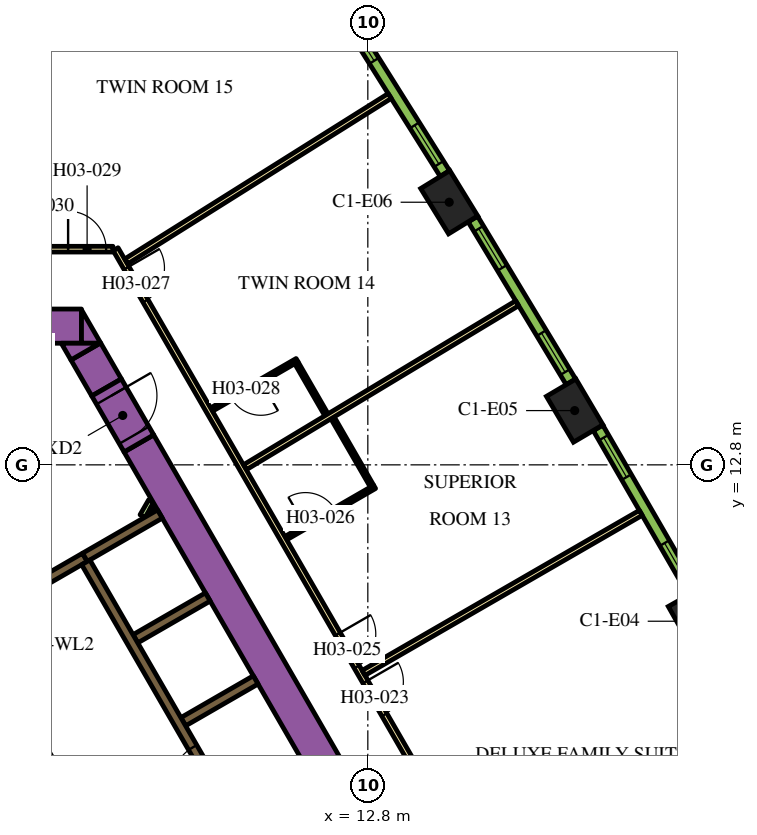
"""IFC4 building model, lengths in metres.
Left out: names, types, materials, properties, quantities, classifications, styles, units other than length and angle.
Written with IfcOpenShell. Run it as: python <this file> out.ifc"""

import sys

from ifc_helpers import new_model, si_unit, direction, frame, frame_2d, origin, origin_2d, place, context, subcontext, project, spatial, polyline, rectangle, outline, extrude, element, fill, save


model = new_model("IFC4")
c1 = context("Model", 3, precision=1e-05, world=origin(), true_north=direction((0.0, 1.0)))
c2 = subcontext(c1, "Body", "Model", "MODEL_VIEW")
j1 = project(units=[si_unit("LENGTHUNIT", "METRE"), si_unit("PLANEANGLEUNIT", "RADIAN")], contexts=[c1])
p1 = place(None, origin())
s1 = spatial("IfcSite", under=j1, at=p1, CompositionType="ELEMENT")
p2 = place(p1, origin())
s2 = spatial("IfcBuilding", under=s1, at=p2, CompositionType="ELEMENT")
p3 = place(p2, frame((0.0, 0.0, 54.9)))
s3 = spatial("IfcBuildingStorey", under=s2, at=p3, CompositionType="ELEMENT", Elevation=54.9)
for number, where, z_axis, x_axis in (
    (1, (21.443, 8.685, 0.0), (0.0, 0.0, 1.0), (-0.492, 0.871, 0.0)),
    (2, (18.243, 14.228, 0.0), (0.0, 0.0, 1.0), (-0.508, 0.861, 0.0)),
    (3, (14.942, 19.71, 0.0), (0.0, 0.0, 1.0), (-0.524, 0.852, 0.0)),
):
    element("IfcColumn", number, at=place(p3, frame(where, z_axis=z_axis, x_axis=x_axis)), inside=s3, PredefinedType="COLUMN", context=c2, shape_type="SweptSolid", body=[
        extrude(rectangle(XDim=1.4, YDim=0.9, at=origin_2d()), origin(), (0.0, 0.0, 1.0), 3.9),
    ])
p4 = place(p3, frame((6.776, 13.364, 0.0), z_axis=(0.0, 0.0, 1.0), x_axis=(0.500004177138, -0.8660229921, 0.0)))
e4 = element("IfcWall", 4, at=p4, inside=s3, PredefinedType="SOLIDWALL", context=c2, shape_type="SweptSolid", body=[
    extrude(rectangle(XDim=20.204, YDim=0.9, at=frame_2d((10.102, 0.0))), origin(), (0.0, 0.0, 1.0), 3.9),
])
p5 = place(p3, frame((-4.224, 16.45, 0.0), z_axis=(0.0, 0.0, 1.0), x_axis=(1.0, 0.0, 0.0)))
e5 = element("IfcWall", 5, at=p5, inside=s3, PredefinedType="SOLIDWALL", context=c2, shape_type="SweptSolid", body=[
    extrude(rectangle(XDim=9.488, YDim=0.9, at=frame_2d((4.744, 0.0))), origin(), (0.0, 0.0, 1.0), 3.9),
])
p6 = place(p3, origin())
e6 = element("IfcWall", 6, at=p6, inside=s3, PredefinedType="SOLIDWALL", context=c2, shape_type="SweptSolid", body=[
    extrude(outline(polyline([(5.265, 16.0), (5.265, 16.88), (5.773, 16.0), (5.265, 16.0)])), origin(), (0.0, 0.0, 1.0), 3.9),
])
p7 = place(p3, frame((5.926, 14.836, 0.0), z_axis=(0.0, 0.0, 1.0), x_axis=(-0.500076735116, 0.865981096212, 0.0)))
e7 = element("IfcWall", 7, at=p7, inside=s3, PredefinedType="SOLIDWALL", context=c2, shape_type="SweptSolid", body=[
    extrude(rectangle(XDim=1.094, YDim=0.9, at=frame_2d((0.547, 0.0))), origin(), (0.0, 0.0, 1.0), 3.9),
])
e8 = element("IfcWall", 8, at=p6, inside=s3, PredefinedType="SOLIDWALL", context=c2, shape_type="SweptSolid", body=[
    extrude(outline(polyline([(4.734, 16.0), (5.75, 16.0), (4.988, 15.56), (4.734, 16.0)])), origin(), (0.0, 0.0, 1.0), 3.9),
])
e9 = element("IfcWall", 9, at=p6, inside=s3, PredefinedType="SOLIDWALL", context=c2, shape_type="SweptSolid", body=[
    extrude(outline(polyline([(0.335, 6.925), (0.335, 6.925), (0.335, 7.075), (0.335, 7.075), (0.335, 7.075), (0.245, 7.075), (0.079, 7.363), (0.035, 7.439), (0.252, 7.564), (0.377, 7.348), (6.552, -3.348), (6.677, -3.564), (6.46, -3.689), (4.897, -0.981), (0.332, 6.925), (0.335, 6.925), (0.335, 6.925)])), origin(), (0.0, 0.0, 1.0), 3.9),
])
p8 = place(p3, frame((4.358, 9.791, 0.0), z_axis=(0.0, 0.0, 1.0), x_axis=(0.866079547155, 0.499906209203, 0.0)))
e10 = element("IfcWall", 10, at=p8, inside=s3, PredefinedType="SOLIDWALL", context=c2, shape_type="SweptSolid", body=[
    extrude(rectangle(XDim=1.15, YDim=0.25, at=frame_2d((0.575, 0.0))), origin(), (0.0, 0.0, 1.0), 3.9),
])
p9 = place(p3, frame((5.356, 10.367, 0.0), z_axis=(0.0, 0.0, 1.0), x_axis=(0.865978535641, 0.50008116922, 0.0)))
e11 = element("IfcWall", 11, at=p9, inside=s3, PredefinedType="SOLIDWALL", context=c2, shape_type="SweptSolid", body=[
    extrude(rectangle(XDim=2.278, YDim=0.25, at=frame_2d((1.139, 0.0))), origin(), (0.0, 0.0, 1.0), 3.9),
])
for number, where, z_axis, x_axis in (
    (12, (6.684, 8.224, 0.0), (0.0, 0.0, 1.0), (0.866, 0.5, 0.0)),
    (13, (7.944, 6.041, 0.0), (0.0, 0.0, 1.0), (0.866, 0.5, 0.0)),
):
    element("IfcWall", number, at=place(p3, frame(where, z_axis=z_axis, x_axis=x_axis)), inside=s3, PredefinedType="SOLIDWALL", context=c2, shape_type="SweptSolid", body=[
        extrude(rectangle(XDim=2.2, YDim=0.25, at=frame_2d((1.1, 0.0))), origin(), (0.0, 0.0, 1.0), 3.9),
    ])
p10 = place(p3, frame((6.872, 11.45, 0.0), z_axis=(0.0, 0.0, 1.0), x_axis=(0.499846793097, 0.866113839764, 0.0)))
e14 = element("IfcWall", 14, at=p10, inside=s3, PredefinedType="PARTITIONING", context=c2, shape_type="SweptSolid", body=[
    extrude(rectangle(XDim=0.453, YDim=0.15, at=frame_2d((0.227, 0.0))), origin(), (0.0, 0.0, 1.0), 2.75),
])
p11 = place(p3, frame((7.131, 11.6, 0.0), z_axis=(0.0, 0.0, 1.0), x_axis=(0.498600033135, 0.866832167699, 0.0)))
e15 = element("IfcWall", 15, at=p11, inside=s3, PredefinedType="PARTITIONING", context=c2, shape_type="SweptSolid", body=[
    extrude(rectangle(XDim=0.107, YDim=0.15, at=frame_2d((0.053, 0.0))), origin(), (0.0, 0.0, 1.0), 2.75),
])
p12 = place(p3, frame((11.553, -0.46, 0.0), z_axis=(0.0, 0.0, 1.0), x_axis=(-0.500006514828, 0.866021642414, 0.0)))
e16 = element("IfcWall", 16, at=p12, inside=s3, PredefinedType="SOLIDWALL", context=c2, shape_type="SweptSolid", body=[
    extrude(rectangle(XDim=12.35, YDim=0.25, at=frame_2d((6.175, 0.0))), origin(), (0.0, 0.0, 1.0), 3.9),
])
p13 = place(p12, frame((0.585, 0.0, 0.0)))
e17 = element("IfcOpeningElement", 17, at=p13, cuts=e16, PredefinedType="OPENING", context=c2, shape_type="SweptSolid", body=[
    extrude(rectangle(XDim=1.1, YDim=2.1, at=frame_2d((0.55, 1.05))), frame((0.0, 0.135, 0.0), z_axis=(0.0, -1.0, 0.0), x_axis=(1.0, 0.0, 0.0)), (0.0, 0.0, 1.0), 0.27),
])
p14 = place(p12, frame((3.105, 0.0, 0.0)))
e18 = element("IfcOpeningElement", 18, at=p14, cuts=e16, PredefinedType="OPENING", context=c2, shape_type="SweptSolid", body=[
    extrude(rectangle(XDim=1.1, YDim=2.1, at=frame_2d((0.55, 1.05))), frame((0.0, 0.135, 0.0), z_axis=(0.0, -1.0, 0.0), x_axis=(1.0, 0.0, 0.0)), (0.0, 0.0, 1.0), 0.27),
])
p15 = place(p12, frame((5.625, 0.0, 0.0)))
e19 = element("IfcOpeningElement", 19, at=p15, cuts=e16, PredefinedType="OPENING", context=c2, shape_type="SweptSolid", body=[
    extrude(rectangle(XDim=1.1, YDim=2.1, at=frame_2d((0.55, 1.05))), frame((0.0, 0.135, 0.0), z_axis=(0.0, -1.0, 0.0), x_axis=(1.0, 0.0, 0.0)), (0.0, 0.0, 1.0), 0.27),
])
p16 = place(p3, frame((8.565, -2.185, 0.0), z_axis=(0.0, 0.0, 1.0), x_axis=(-0.499997954832, 0.866026584559, 0.0)))
e20 = element("IfcWall", 20, at=p16, inside=s3, PredefinedType="SOLIDWALL", context=c2, shape_type="SweptSolid", body=[
    extrude(rectangle(XDim=12.35, YDim=0.25, at=frame_2d((6.175, 0.0))), origin(), (0.0, 0.0, 1.0), 3.9),
])
p17 = place(p16, frame((5.725, 0.0, 0.0)))
e21 = element("IfcOpeningElement", 21, at=p17, cuts=e20, PredefinedType="OPENING", context=c2, shape_type="SweptSolid", body=[
    extrude(rectangle(XDim=0.9, YDim=2.1, at=frame_2d((0.45, 1.05))), frame((0.0, 0.135, 0.0), z_axis=(0.0, -1.0, 0.0), x_axis=(1.0, 0.0, 0.0)), (0.0, 0.0, 1.0), 0.27),
])
p18 = place(p3, frame((5.926, 14.836, 0.0), z_axis=(0.0, 0.0, 1.0), x_axis=(0.500062241894, -0.865989465428, 0.0)))
e22 = element("IfcWall", 22, at=p18, inside=s3, PredefinedType="SOLIDWALL", context=c2, shape_type="SweptSolid", body=[
    extrude(rectangle(XDim=1.7, YDim=0.9, at=frame_2d((0.85, 0.0))), origin(), (0.0, 0.0, 1.0), 3.9),
])
p19 = place(p18, frame((0.25, 0.0, 0.0)))
e23 = element("IfcOpeningElement", 23, at=p19, cuts=e22, PredefinedType="OPENING", context=c2, shape_type="SweptSolid", body=[
    extrude(rectangle(XDim=1.2, YDim=2.1, at=frame_2d((0.6, 1.05))), frame((0.0, 0.46, 0.0), z_axis=(0.0, -1.0, 0.0), x_axis=(1.0, 0.0, 0.0)), (0.0, 0.0, 1.0), 0.92),
])
p20 = place(p3, frame((6.163, 18.475, 0.0), z_axis=(0.0, 0.0, 1.0), x_axis=(0.500001317485, -0.866024643133, 0.0)))
e24 = element("IfcWall", 24, at=p20, inside=s3, PredefinedType="PARTITIONING", context=c2, shape_type="SweptSolid", body=[
    extrude(rectangle(XDim=25.767, YDim=0.15, at=frame_2d((12.883, 0.0))), origin(), (0.0, 0.0, 1.0), 2.75),
])
p21 = place(p20, frame((24.586, 0.0, 0.0)))
e25 = element("IfcOpeningElement", 25, at=p21, cuts=e24, PredefinedType="OPENING", context=c2, shape_type="SweptSolid", body=[
    extrude(rectangle(XDim=1.0, YDim=2.1, at=frame_2d((0.5, 1.05))), frame((0.0, 0.085, 0.0), z_axis=(0.0, -1.0, 0.0), x_axis=(1.0, 0.0, 0.0)), (0.0, 0.0, 1.0), 0.17),
])
p22 = place(p20, frame((13.144, 0.0, 0.0)))
e26 = element("IfcOpeningElement", 26, at=p22, cuts=e24, PredefinedType="OPENING", context=c2, shape_type="SweptSolid", body=[
    extrude(rectangle(XDim=1.0, YDim=2.1, at=frame_2d((0.5, 1.05))), frame((0.0, 0.085, 0.0), z_axis=(0.0, -1.0, 0.0), x_axis=(1.0, 0.0, 0.0)), (0.0, 0.0, 1.0), 0.17),
])
p23 = place(p20, frame((11.692, 0.0, 0.0)))
e27 = element("IfcOpeningElement", 27, at=p23, cuts=e24, PredefinedType="OPENING", context=c2, shape_type="SweptSolid", body=[
    extrude(rectangle(XDim=1.0, YDim=2.1, at=frame_2d((0.5, 1.05))), frame((0.0, 0.085, 0.0), z_axis=(0.0, -1.0, 0.0), x_axis=(1.0, 0.0, 0.0)), (0.0, 0.0, 1.0), 0.17),
])
p24 = place(p20, frame((0.572, 0.0, 0.0)))
e28 = element("IfcOpeningElement", 28, at=p24, cuts=e24, PredefinedType="OPENING", context=c2, shape_type="SweptSolid", body=[
    extrude(rectangle(XDim=1.0, YDim=2.1, at=frame_2d((0.5, 1.05))), frame((0.0, 0.085, 0.0), z_axis=(0.0, -1.0, 0.0), x_axis=(1.0, 0.0, 0.0)), (0.0, 0.0, 1.0), 0.17),
])
p25 = place(p3, frame((0.825, 18.475, 0.0), z_axis=(0.0, 0.0, 1.0), x_axis=(1.0, 0.0, 0.0)))
e29 = element("IfcWall", 29, at=p25, inside=s3, PredefinedType="PARTITIONING", context=c2, shape_type="SweptSolid", body=[
    extrude(rectangle(XDim=5.268, YDim=0.15, at=frame_2d((2.634, 0.0))), origin(), (0.0, 0.0, 1.0), 2.75),
])
p26 = place(p25, frame((4.088, 0.0, 0.0)))
e30 = element("IfcOpeningElement", 30, at=p26, cuts=e29, PredefinedType="OPENING", context=c2, shape_type="SweptSolid", body=[
    extrude(rectangle(XDim=1.0, YDim=2.1, at=frame_2d((0.5, 1.05))), frame((0.0, 0.085, 0.0), z_axis=(0.0, -1.0, 0.0), x_axis=(1.0, 0.0, 0.0)), (0.0, 0.0, 1.0), 0.17),
])
p27 = place(p3, frame((9.922, 27.896, 0.0), z_axis=(0.0, 0.0, 1.0), x_axis=(-0.836970816595, -0.547247523675, 0.0)))
e31 = element("IfcWall", 31, at=p27, inside=s3, PredefinedType="PARTITIONING", context=c2, shape_type="SweptSolid", body=[
    extrude(rectangle(XDim=10.729, YDim=0.15, at=frame_2d((5.364, 0.0))), origin(), (0.0, 0.0, 1.0), 2.75),
])
p28 = place(p3, frame((13.376, 22.506, 0.0), z_axis=(0.0, 0.0, 1.0), x_axis=(-0.846945608893, -0.531679542183, 0.0)))
e32 = element("IfcWall", 32, at=p28, inside=s3, PredefinedType="PARTITIONING", context=c2, shape_type="SweptSolid", body=[
    extrude(rectangle(XDim=8.182, YDim=0.15, at=frame_2d((4.091, 0.0))), origin(), (0.0, 0.0, 1.0), 2.75),
])
p29 = place(p3, frame((16.729, 17.052, 0.0), z_axis=(0.0, 0.0, 1.0), x_axis=(-0.856630606266, -0.515930232113, 0.0)))
e33 = element("IfcWall", 33, at=p29, inside=s3, PredefinedType="PARTITIONING", context=c2, shape_type="SweptSolid", body=[
    extrude(rectangle(XDim=8.355, YDim=0.15, at=frame_2d((4.178, 0.0))), origin(), (0.0, 0.0, 1.0), 2.75),
])
p30 = place(p3, frame((19.982, 11.537, 0.0), z_axis=(0.0, 0.0, 1.0), x_axis=(-0.866020994654, -0.500007636761, 0.0)))
e34 = element("IfcWall", 34, at=p30, inside=s3, PredefinedType="PARTITIONING", context=c2, shape_type="SweptSolid", body=[
    extrude(rectangle(XDim=8.423, YDim=0.15, at=frame_2d((4.211, 0.0))), origin(), (0.0, 0.0, 1.0), 2.75),
])
p31 = place(p3, frame((10.64, 10.871, 0.0), z_axis=(0.0, 0.0, 1.0), x_axis=(0.866036505625, 0.499980770555, 0.0)))
e35 = element("IfcWall", 35, at=p31, inside=s3, PredefinedType="PARTITIONING", context=c2, shape_type="SweptSolid", body=[
    extrude(rectangle(XDim=2.7, YDim=0.1, at=frame_2d((1.35, 0.0))), origin(), (0.0, 0.0, 1.0), 2.75),
])
p32 = place(p31, frame((0.6, 0.0, 0.0)))
e36 = element("IfcOpeningElement", 36, at=p32, cuts=e35, PredefinedType="OPENING", context=c2, shape_type="SweptSolid", body=[
    extrude(rectangle(XDim=0.9, YDim=2.1, at=frame_2d((0.45, 1.05))), frame((0.0, 0.06, 0.0), z_axis=(0.0, -1.0, 0.0), x_axis=(1.0, 0.0, 0.0)), (0.0, 0.0, 1.0), 0.12),
])
p33 = place(p3, frame((12.91, 12.239, 0.0), z_axis=(0.0, 0.0, 1.0), x_axis=(-0.499957272447, 0.866050071143, 0.0)))
e37 = element("IfcWall", 37, at=p33, inside=s3, PredefinedType="PARTITIONING", context=c2, shape_type="SweptSolid", body=[
    extrude(rectangle(XDim=2.07, YDim=0.1, at=frame_2d((1.035, 0.0))), origin(), (0.0, 0.0, 1.0), 2.75),
])
p34 = place(p3, frame((10.938, 15.554, 0.0), z_axis=(0.0, 0.0, 1.0), x_axis=(-0.866062058628, -0.499936506574, 0.0)))
e38 = element("IfcWall", 38, at=p34, inside=s3, PredefinedType="PARTITIONING", context=c2, shape_type="SweptSolid", body=[
    extrude(rectangle(XDim=2.6, YDim=0.1, at=frame_2d((1.3, 0.0))), origin(), (0.0, 0.0, 1.0), 2.75),
])
p35 = place(p34, frame((1.1, 0.0, 0.0)))
e39 = element("IfcOpeningElement", 39, at=p35, cuts=e38, PredefinedType="OPENING", context=c2, shape_type="SweptSolid", body=[
    extrude(rectangle(XDim=0.9, YDim=2.1, at=frame_2d((0.45, 1.05))), frame((0.0, 0.06, 0.0), z_axis=(0.0, -1.0, 0.0), x_axis=(1.0, 0.0, 0.0)), (0.0, 0.0, 1.0), 0.12),
])
p36 = place(p3, frame((10.92, 15.486, 0.0), z_axis=(0.0, 0.0, 1.0), x_axis=(0.499994407638, -0.866028632512, 0.0)))
e40 = element("IfcWall", 40, at=p36, inside=s3, PredefinedType="PARTITIONING", context=c2, shape_type="SweptSolid", body=[
    extrude(rectangle(XDim=1.58, YDim=0.1, at=frame_2d((0.79, 0.0))), origin(), (0.0, 0.0, 1.0), 2.75),
])
p37 = place(p3, frame((21.357, 9.445, 0.0), z_axis=(0.0, 0.0, 1.0), x_axis=(-0.50002123722, 0.866013142123, 0.0)))
e41 = element("IfcWall", 41, at=p37, inside=s3, PredefinedType="SOLIDWALL", context=c2, shape_type="SweptSolid", body=[
    extrude(rectangle(XDim=4.998, YDim=0.29, at=frame_2d((2.499, 0.0))), origin(), (0.0, 0.0, 1.0), 3.65),
])
p38 = place(p37, frame((0.297, 0.0, 0.9)))
e42 = element("IfcOpeningElement", 42, at=p38, cuts=e41, PredefinedType="OPENING", context=c2, shape_type="SweptSolid", body=[
    extrude(rectangle(XDim=1.2, YDim=2.15, at=frame_2d((0.6, 1.075))), frame((0.0, 0.155, 0.0), z_axis=(0.0, -1.0, 0.0), x_axis=(1.0, 0.0, 0.0)), (0.0, 0.0, 1.0), 0.31),
])
p39 = place(p37, frame((3.501, 0.0, 0.9)))
e43 = element("IfcOpeningElement", 43, at=p39, cuts=e41, PredefinedType="OPENING", context=c2, shape_type="SweptSolid", body=[
    extrude(rectangle(XDim=1.2, YDim=2.15, at=frame_2d((0.6, 1.075))), frame((0.0, 0.155, 0.0), z_axis=(0.0, -1.0, 0.0), x_axis=(1.0, 0.0, 0.0)), (0.0, 0.0, 1.0), 0.31),
])
p40 = place(p3, frame((18.143, 14.986, 0.0), z_axis=(0.0, 0.0, 1.0), x_axis=(-0.515938796285, 0.856625448191, 0.0)))
e44 = element("IfcWall", 44, at=p40, inside=s3, PredefinedType="SOLIDWALL", context=c2, shape_type="SweptSolid", body=[
    extrude(rectangle(XDim=4.998, YDim=0.29, at=frame_2d((2.499, 0.0))), origin(), (0.0, 0.0, 1.0), 3.65),
])
p41 = place(p40, frame((0.297, 0.0, 0.9)))
e45 = element("IfcOpeningElement", 45, at=p41, cuts=e44, PredefinedType="OPENING", context=c2, shape_type="SweptSolid", body=[
    extrude(rectangle(XDim=1.2, YDim=2.15, at=frame_2d((0.6, 1.075))), frame((0.0, 0.155, 0.0), z_axis=(0.0, -1.0, 0.0), x_axis=(1.0, 0.0, 0.0)), (0.0, 0.0, 1.0), 0.31),
])
p42 = place(p40, frame((3.501, 0.0, 0.9)))
e46 = element("IfcOpeningElement", 46, at=p42, cuts=e44, PredefinedType="OPENING", context=c2, shape_type="SweptSolid", body=[
    extrude(rectangle(XDim=1.2, YDim=2.15, at=frame_2d((0.6, 1.075))), frame((0.0, 0.155, 0.0), z_axis=(0.0, -1.0, 0.0), x_axis=(1.0, 0.0, 0.0)), (0.0, 0.0, 1.0), 0.31),
])
p43 = place(p3, frame((14.827, 20.466, 0.0), z_axis=(0.0, 0.0, 1.0), x_axis=(-0.531688286542, 0.846940119462, 0.0)))
e47 = element("IfcWall", 47, at=p43, inside=s3, PredefinedType="SOLIDWALL", context=c2, shape_type="SweptSolid", body=[
    extrude(rectangle(XDim=4.998, YDim=0.29, at=frame_2d((2.499, 0.0))), origin(), (0.0, 0.0, 1.0), 3.65),
])
p44 = place(p43, frame((0.297, 0.0, 0.9)))
e48 = element("IfcOpeningElement", 48, at=p44, cuts=e47, PredefinedType="OPENING", context=c2, shape_type="SweptSolid", body=[
    extrude(rectangle(XDim=1.2, YDim=2.15, at=frame_2d((0.6, 1.075))), frame((0.0, 0.155, 0.0), z_axis=(0.0, -1.0, 0.0), x_axis=(1.0, 0.0, 0.0)), (0.0, 0.0, 1.0), 0.31),
])
p45 = place(p43, frame((3.501, 0.0, 0.9)))
e49 = element("IfcOpeningElement", 49, at=p45, cuts=e47, PredefinedType="OPENING", context=c2, shape_type="SweptSolid", body=[
    extrude(rectangle(XDim=1.2, YDim=2.15, at=frame_2d((0.6, 1.075))), frame((0.0, 0.155, 0.0), z_axis=(0.0, -1.0, 0.0), x_axis=(1.0, 0.0, 0.0)), (0.0, 0.0, 1.0), 0.31),
])
p46 = place(p15, origin())
e50 = element("IfcDoor", 50, at=p46, inside=s3, OperationType="DOUBLE_DOOR_SLIDING", PredefinedType="DOOR", context=c2, shape_type="SweptSolid", body=[
    extrude(rectangle(XDim=1.1, YDim=2.1, at=frame_2d((0.55, 1.05))), frame((0.0, 0.025, 0.0), z_axis=(0.0, -1.0, 0.0), x_axis=(1.0, 0.0, 0.0)), (0.0, 0.0, 1.0), 0.05),
])
fill(e19, e50)
p47 = place(p19, origin())
e51 = element("IfcDoor", 51, at=p47, inside=s3, OperationType="SINGLE_SWING_LEFT", PredefinedType="DOOR", context=c2, shape_type="SweptSolid", body=[
    extrude(rectangle(XDim=1.2, YDim=2.1, at=frame_2d((0.6, 1.05))), frame((0.0, 0.025, 0.0), z_axis=(0.0, -1.0, 0.0), x_axis=(1.0, 0.0, 0.0)), (0.0, 0.0, 1.0), 0.05),
])
fill(e23, e51)
p48 = place(p22, origin())
e52 = element("IfcDoor", 52, at=p48, inside=s3, OperationType="SINGLE_SWING_LEFT", PredefinedType="DOOR", context=c2, shape_type="SweptSolid", body=[
    extrude(rectangle(XDim=1.0, YDim=2.1, at=frame_2d((0.5, 1.05))), frame((0.0, 0.025, 0.0), z_axis=(0.0, -1.0, 0.0), x_axis=(1.0, 0.0, 0.0)), (0.0, 0.0, 1.0), 0.05),
])
fill(e26, e52)
p49 = place(p23, origin())
e53 = element("IfcDoor", 53, at=p49, inside=s3, OperationType="SINGLE_SWING_RIGHT", PredefinedType="DOOR", context=c2, shape_type="SweptSolid", body=[
    extrude(rectangle(XDim=1.0, YDim=2.1, at=frame_2d((0.5, 1.05))), frame((0.0, 0.025, 0.0), z_axis=(0.0, -1.0, 0.0), x_axis=(1.0, 0.0, 0.0)), (0.0, 0.0, 1.0), 0.05),
])
fill(e27, e53)
p50 = place(p32, origin())
e54 = element("IfcDoor", 54, at=p50, inside=s3, OperationType="SINGLE_SWING_LEFT", PredefinedType="DOOR", context=c2, shape_type="SweptSolid", body=[
    extrude(rectangle(XDim=0.9, YDim=2.1, at=frame_2d((0.45, 1.05))), frame((0.0, 0.025, 0.0), z_axis=(0.0, -1.0, 0.0), x_axis=(1.0, 0.0, 0.0)), (0.0, 0.0, 1.0), 0.05),
])
fill(e36, e54)
p51 = place(p24, origin())
e55 = element("IfcDoor", 55, at=p51, inside=s3, OperationType="SINGLE_SWING_LEFT", PredefinedType="DOOR", context=c2, shape_type="SweptSolid", body=[
    extrude(rectangle(XDim=1.0, YDim=2.1, at=frame_2d((0.5, 1.05))), frame((0.0, 0.025, 0.0), z_axis=(0.0, -1.0, 0.0), x_axis=(1.0, 0.0, 0.0)), (0.0, 0.0, 1.0), 0.05),
])
fill(e28, e55)
p52 = place(p35, origin())
e56 = element("IfcDoor", 56, at=p52, inside=s3, OperationType="SINGLE_SWING_LEFT", PredefinedType="DOOR", context=c2, shape_type="SweptSolid", body=[
    extrude(rectangle(XDim=0.9, YDim=2.1, at=frame_2d((0.45, 1.05))), frame((0.0, 0.025, 0.0), z_axis=(0.0, -1.0, 0.0), x_axis=(1.0, 0.0, 0.0)), (0.0, 0.0, 1.0), 0.05),
])
fill(e39, e56)
p53 = place(p26, origin())
e57 = element("IfcDoor", 57, at=p53, inside=s3, OperationType="SINGLE_SWING_RIGHT", PredefinedType="DOOR", context=c2, shape_type="SweptSolid", body=[
    extrude(rectangle(XDim=1.0, YDim=2.1, at=frame_2d((0.5, 1.05))), frame((0.0, 0.025, 0.0), z_axis=(0.0, -1.0, 0.0), x_axis=(1.0, 0.0, 0.0)), (0.0, 0.0, 1.0), 0.05),
])
fill(e30, e57)
p54 = place(p38, origin())
e58 = element("IfcWindow", 58, at=p54, inside=s3, PartitioningType="DOUBLE_PANEL_VERTICAL", PredefinedType="WINDOW", context=c2, shape_type="SweptSolid", body=[
    extrude(rectangle(XDim=1.2, YDim=2.15, at=frame_2d((0.6, 1.075))), frame((0.0, 0.015, 0.0), z_axis=(0.0, -1.0, 0.0), x_axis=(1.0, 0.0, 0.0)), (0.0, 0.0, 1.0), 0.06),
])
fill(e42, e58)
p55 = place(p39, origin())
e59 = element("IfcWindow", 59, at=p55, inside=s3, PartitioningType="DOUBLE_PANEL_VERTICAL", PredefinedType="WINDOW", context=c2, shape_type="SweptSolid", body=[
    extrude(rectangle(XDim=1.2, YDim=2.15, at=frame_2d((0.6, 1.075))), frame((0.0, 0.015, 0.0), z_axis=(0.0, -1.0, 0.0), x_axis=(1.0, 0.0, 0.0)), (0.0, 0.0, 1.0), 0.06),
])
fill(e43, e59)
p56 = place(p41, origin())
e60 = element("IfcWindow", 60, at=p56, inside=s3, PartitioningType="DOUBLE_PANEL_VERTICAL", PredefinedType="WINDOW", context=c2, shape_type="SweptSolid", body=[
    extrude(rectangle(XDim=1.2, YDim=2.15, at=frame_2d((0.6, 1.075))), frame((0.0, 0.015, 0.0), z_axis=(0.0, -1.0, 0.0), x_axis=(1.0, 0.0, 0.0)), (0.0, 0.0, 1.0), 0.06),
])
fill(e45, e60)
p57 = place(p42, origin())
e61 = element("IfcWindow", 61, at=p57, inside=s3, PartitioningType="DOUBLE_PANEL_VERTICAL", PredefinedType="WINDOW", context=c2, shape_type="SweptSolid", body=[
    extrude(rectangle(XDim=1.2, YDim=2.15, at=frame_2d((0.6, 1.075))), frame((0.0, 0.015, 0.0), z_axis=(0.0, -1.0, 0.0), x_axis=(1.0, 0.0, 0.0)), (0.0, 0.0, 1.0), 0.06),
])
fill(e46, e61)
p58 = place(p44, origin())
e62 = element("IfcWindow", 62, at=p58, inside=s3, PartitioningType="DOUBLE_PANEL_VERTICAL", PredefinedType="WINDOW", context=c2, shape_type="SweptSolid", body=[
    extrude(rectangle(XDim=1.2, YDim=2.15, at=frame_2d((0.6, 1.075))), frame((0.0, 0.015, 0.0), z_axis=(0.0, -1.0, 0.0), x_axis=(1.0, 0.0, 0.0)), (0.0, 0.0, 1.0), 0.06),
])
fill(e48, e62)
p59 = place(p45, origin())
e63 = element("IfcWindow", 63, at=p59, inside=s3, PartitioningType="DOUBLE_PANEL_VERTICAL", PredefinedType="WINDOW", context=c2, shape_type="SweptSolid", body=[
    extrude(rectangle(XDim=1.2, YDim=2.15, at=frame_2d((0.6, 1.075))), frame((0.0, 0.015, 0.0), z_axis=(0.0, -1.0, 0.0), x_axis=(1.0, 0.0, 0.0)), (0.0, 0.0, 1.0), 0.06),
])
fill(e49, e63)
save(model, sys.argv[1])
